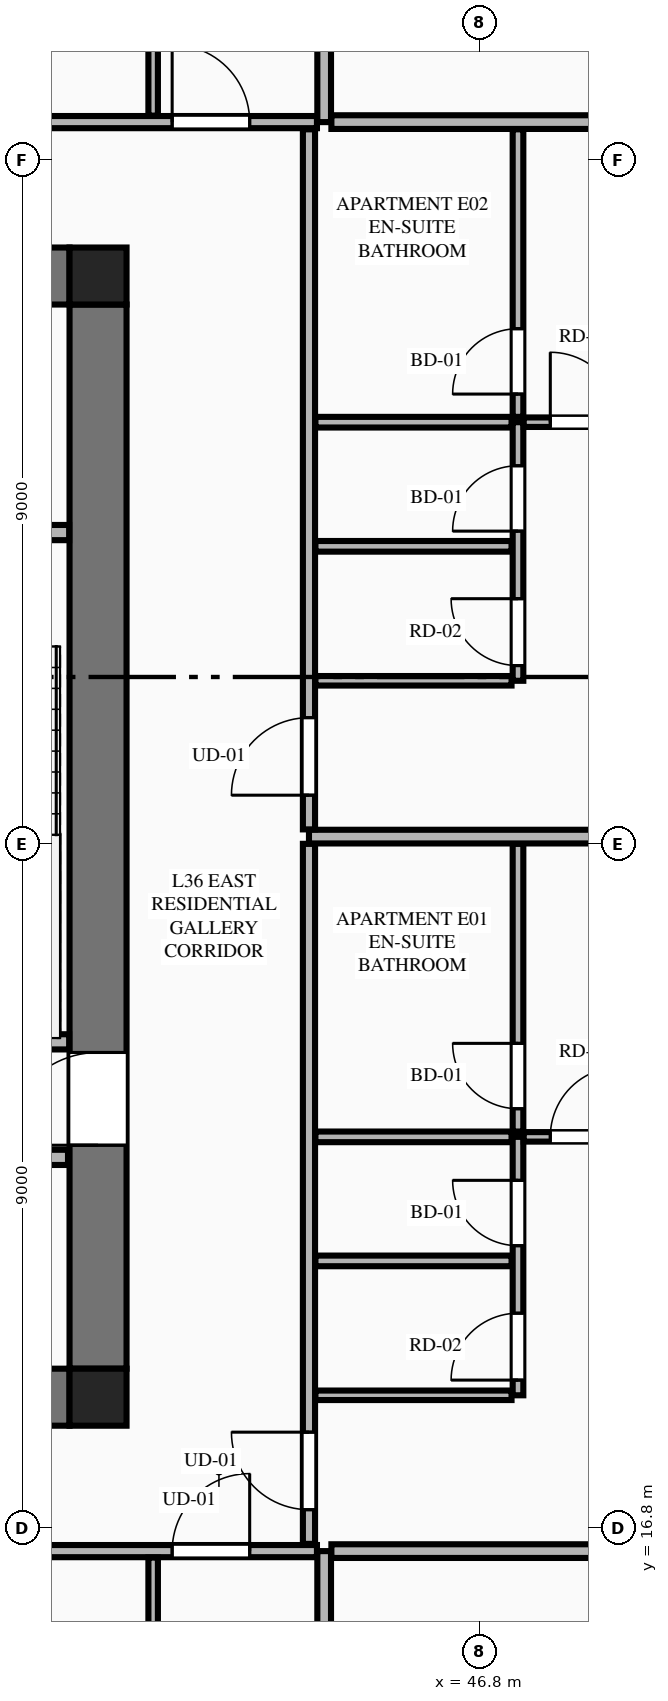
"""IFC4 building model, lengths in metres.
Left out: names, types, materials, properties, quantities, classifications, styles, units other than length and angle.
Written with IfcOpenShell. Run it as: python <this file> out.ifc"""

import sys

from ifc_helpers import new_model, si_unit, direction, frame, frame_2d, origin, origin_2d, place, context, subcontext, project, spatial, rectangle, extrude, element, fill, save


model = new_model("IFC4")
c1 = context("Model", 3, precision=1e-05, world=origin(), true_north=direction((0.0, 1.0)))
c2 = subcontext(c1, "Body", "Model", "MODEL_VIEW")
j1 = project(units=[si_unit("LENGTHUNIT", "METRE"), si_unit("PLANEANGLEUNIT", "RADIAN")], contexts=[c1])
p1 = place(None, origin())
s1 = spatial("IfcSite", under=j1, at=p1, CompositionType="ELEMENT")
p2 = place(p1, origin())
s2 = spatial("IfcBuilding", under=s1, at=p2, CompositionType="ELEMENT")
p3 = place(p2, frame((0.0, 0.0, 137.45)))
s3 = spatial("IfcBuildingStorey", under=s2, at=p3, CompositionType="ELEMENT", Elevation=137.45)
for number, where, z_axis, x_axis in (
    (1, (41.775, 18.525, 0.0), (0.0, 0.0, 1.0), (1.0, 0.0, 0.0)),
    (2, (41.775, 33.275, 0.0), (0.0, 0.0, 1.0), (1.0, 0.0, 0.0)),
):
    element("IfcColumn", number, at=place(p3, frame(where, z_axis=z_axis, x_axis=x_axis)), inside=s3, PredefinedType="COLUMN", context=c2, shape_type="SweptSolid", body=[
        extrude(rectangle(XDim=0.75, YDim=0.75, at=origin_2d()), origin(), (0.0, 0.0, 1.0), 3.55),
    ])
for number, where, z_axis, x_axis in (
    (3, (23.4, 18.525, 0.0), (0.0, 0.0, 1.0), (1.0, 0.0, 0.0)),
    (4, (23.4, 33.275, 0.0), (0.0, 0.0, 1.0), (1.0, 0.0, 0.0)),
):
    element("IfcWall", number, at=place(p3, frame(where, z_axis=z_axis, x_axis=x_axis)), inside=s3, PredefinedType="SHEAR", context=c2, shape_type="SweptSolid", body=[
        extrude(rectangle(XDim=18.0, YDim=0.75, at=frame_2d((9.0, 0.0))), origin(), (0.0, 0.0, 1.0), 3.34),
    ])
p4 = place(p3, frame((41.775, 18.9, 0.0), z_axis=(0.0, 0.0, 1.0), x_axis=(0.0, 1.0, 0.0)))
e5 = element("IfcWall", 5, at=p4, inside=s3, PredefinedType="SHEAR", context=c2, shape_type="SweptSolid", body=[
    extrude(rectangle(XDim=14.0, YDim=0.75, at=frame_2d((7.0, 0.0))), origin(), (0.0, 0.0, 1.0), 3.34),
])
p5 = place(p4, frame((2.94, 0.0, 0.0)))
e6 = element("IfcOpeningElement", 6, at=p5, cuts=e5, PredefinedType="OPENING", context=c2, shape_type="SweptSolid", body=[
    extrude(rectangle(XDim=1.22, YDim=2.25, at=frame_2d((0.61, 1.125))), frame((0.0, 0.385, 0.0), z_axis=(0.0, -1.0, 0.0), x_axis=(1.0, 0.0, 0.0)), (0.0, 0.0, 1.0), 0.77),
])
p6 = place(p3, frame((38.125, 23.2, 0.0), z_axis=(0.0, 0.0, 1.0), x_axis=(1.0, 0.0, 0.0)))
e7 = element("IfcWall", 7, at=p6, inside=s3, PredefinedType="PLUMBINGWALL", context=c2, shape_type="SweptSolid", body=[
    extrude(rectangle(XDim=3.27, YDim=0.2, at=frame_2d((1.635, 0.0))), origin(), (0.0, 0.0, 1.0), 3.34),
])
p7 = place(p3, frame((38.125, 29.9, 0.0), z_axis=(0.0, 0.0, 1.0), x_axis=(1.0, 0.0, 0.0)))
e8 = element("IfcWall", 8, at=p7, inside=s3, PredefinedType="PLUMBINGWALL", context=c2, shape_type="SweptSolid", body=[
    extrude(rectangle(XDim=3.27, YDim=0.2, at=frame_2d((1.635, 0.0))), origin(), (0.0, 0.0, 1.0), 3.34),
])
p8 = place(p7, frame((0.5, 0.0, 0.0)))
e9 = element("IfcOpeningElement", 9, at=p8, cuts=e8, PredefinedType="OPENING", context=c2, shape_type="SweptSolid", body=[
    extrude(rectangle(XDim=0.85, YDim=2.05, at=frame_2d((0.425, 1.025))), frame((0.0, 0.11, 0.0), z_axis=(0.0, -1.0, 0.0), x_axis=(1.0, 0.0, 0.0)), (0.0, 0.0, 1.0), 0.22),
])
p9 = place(p3, frame((23.42, 21.68, 0.0), z_axis=(0.0, 0.0, 1.0), x_axis=(1.0, 0.0, 0.0)))
e10 = element("IfcWall", 10, at=p9, inside=s3, PredefinedType="PLUMBINGWALL", context=c2, shape_type="SweptSolid", body=[
    extrude(rectangle(XDim=17.96, YDim=0.2, at=frame_2d((8.98, 0.0))), origin(), (0.0, 0.0, 1.0), 3.34),
])
p10 = place(p9, frame((11.6, 0.0, 0.0)))
e11 = element("IfcOpeningElement", 11, at=p10, cuts=e10, PredefinedType="OPENING", context=c2, shape_type="SweptSolid", body=[
    extrude(rectangle(XDim=1.1, YDim=2.2, at=frame_2d((0.55, 1.1))), frame((0.0, 0.11, 0.0), z_axis=(0.0, -1.0, 0.0), x_axis=(1.0, 0.0, 0.0)), (0.0, 0.0, 1.0), 0.22),
])
p11 = place(p9, frame((0.41, 0.0, 0.0)))
e12 = element("IfcOpeningElement", 12, at=p11, cuts=e10, PredefinedType="OPENING", context=c2, shape_type="SweptSolid", body=[
    extrude(rectangle(XDim=0.85, YDim=2.05, at=frame_2d((0.425, 1.025))), frame((0.0, 0.11, 0.0), z_axis=(0.0, -1.0, 0.0), x_axis=(1.0, 0.0, 0.0)), (0.0, 0.0, 1.0), 0.22),
])
p12 = place(p9, frame((6.03, 0.0, 0.0)))
e13 = element("IfcOpeningElement", 13, at=p12, cuts=e10, PredefinedType="OPENING", context=c2, shape_type="SweptSolid", body=[
    extrude(rectangle(XDim=0.85, YDim=2.05, at=frame_2d((0.425, 1.025))), frame((0.0, 0.11, 0.0), z_axis=(0.0, -1.0, 0.0), x_axis=(1.0, 0.0, 0.0)), (0.0, 0.0, 1.0), 0.22),
])
p13 = place(p9, frame((13.78, 0.0, 0.0)))
e14 = element("IfcOpeningElement", 14, at=p13, cuts=e10, PredefinedType="OPENING", context=c2, shape_type="SweptSolid", body=[
    extrude(rectangle(XDim=0.85, YDim=2.05, at=frame_2d((0.425, 1.025))), frame((0.0, 0.11, 0.0), z_axis=(0.0, -1.0, 0.0), x_axis=(1.0, 0.0, 0.0)), (0.0, 0.0, 1.0), 0.22),
])
p14 = place(p3, frame((44.75, 4.105, 0.0), z_axis=(0.0, 0.0, 1.0), x_axis=(0.0, 1.0, 0.0)))
e15 = element("IfcWall", 15, at=p14, inside=s3, PredefinedType="PARTITIONING", context=c2, shape_type="SweptSolid", body=[
    extrude(rectangle(XDim=12.395, YDim=0.18, at=frame_2d((6.198, 0.0))), origin(), (0.0, 0.0, 1.0), 3.34),
])
p15 = place(p3, frame((28.663, 16.5, 0.0), z_axis=(0.0, 0.0, 1.0), x_axis=(1.0, 0.0, 0.0)))
e16 = element("IfcWall", 16, at=p15, inside=s3, PredefinedType="PARTITIONING", context=c2, shape_type="SweptSolid", body=[
    extrude(rectangle(XDim=15.992, YDim=0.16, at=frame_2d((7.996, 0.0))), origin(), (0.0, 0.0, 1.0), 3.34),
])
p16 = place(p15, frame((14.087, 0.0, 0.0)))
e17 = element("IfcOpeningElement", 17, at=p16, cuts=e16, PredefinedType="OPENING", context=c2, shape_type="SweptSolid", body=[
    extrude(rectangle(XDim=1.02, YDim=2.25, at=frame_2d((0.51, 1.125))), frame((0.0, 0.09, 0.0), z_axis=(0.0, -1.0, 0.0), x_axis=(1.0, 0.0, 0.0)), (0.0, 0.0, 1.0), 0.18),
])
p17 = place(p3, frame((42.5, 12.887, 0.0), z_axis=(0.0, 0.0, 1.0), x_axis=(0.0, 1.0, 0.0)))
e18 = element("IfcWall", 18, at=p17, inside=s3, PredefinedType="PARTITIONING", context=c2, shape_type="SweptSolid", body=[
    extrude(rectangle(XDim=3.528, YDim=0.125, at=frame_2d((1.764, 0.0))), origin(), (0.0, 0.0, 1.0), 2.722),
])
p18 = place(p3, frame((44.75, 35.3, 0.0), z_axis=(0.0, 0.0, 1.0), x_axis=(0.0, 1.0, 0.0)))
e19 = element("IfcWall", 19, at=p18, inside=s3, PredefinedType="PARTITIONING", context=c2, shape_type="SweptSolid", body=[
    extrude(rectangle(XDim=12.195, YDim=0.18, at=frame_2d((6.098, 0.0))), origin(), (0.0, 0.0, 1.0), 3.34),
])
p19 = place(p3, frame((28.663, 35.3, 0.0), z_axis=(0.0, 0.0, 1.0), x_axis=(1.0, 0.0, 0.0)))
e20 = element("IfcWall", 20, at=p19, inside=s3, PredefinedType="PARTITIONING", context=c2, shape_type="SweptSolid", body=[
    extrude(rectangle(XDim=15.992, YDim=0.16, at=frame_2d((7.996, 0.0))), origin(), (0.0, 0.0, 1.0), 3.34),
])
p20 = place(p19, frame((14.087, 0.0, 0.0)))
e21 = element("IfcOpeningElement", 21, at=p20, cuts=e20, PredefinedType="OPENING", context=c2, shape_type="SweptSolid", body=[
    extrude(rectangle(XDim=1.02, YDim=2.25, at=frame_2d((0.51, 1.125))), frame((0.0, 0.09, 0.0), z_axis=(0.0, -1.0, 0.0), x_axis=(1.0, 0.0, 0.0)), (0.0, 0.0, 1.0), 0.18),
])
p21 = place(p3, frame((42.5, 35.385, 0.0), z_axis=(0.0, 0.0, 1.0), x_axis=(0.0, 1.0, 0.0)))
e22 = element("IfcWall", 22, at=p21, inside=s3, PredefinedType="PARTITIONING", context=c2, shape_type="SweptSolid", body=[
    extrude(rectangle(XDim=6.151, YDim=0.125, at=frame_2d((3.075, 0.0))), origin(), (0.0, 0.0, 1.0), 2.722),
])
p22 = place(p3, frame((44.845, 16.5, 0.0), z_axis=(0.0, 0.0, 1.0), x_axis=(1.0, 0.0, 0.0)))
e23 = element("IfcWall", 23, at=p22, inside=s3, PredefinedType="PARTITIONING", context=c2, shape_type="SweptSolid", body=[
    extrude(rectangle(XDim=7.77, YDim=0.18, at=frame_2d((3.885, 0.0))), origin(), (0.0, 0.0, 1.0), 3.34),
])
p23 = place(p3, frame((44.845, 35.3, 0.0), z_axis=(0.0, 0.0, 1.0), x_axis=(1.0, 0.0, 0.0)))
e24 = element("IfcWall", 24, at=p23, inside=s3, PredefinedType="PARTITIONING", context=c2, shape_type="SweptSolid", body=[
    extrude(rectangle(XDim=7.669, YDim=0.18, at=frame_2d((3.834, 0.0))), origin(), (0.0, 0.0, 1.0), 3.34),
])
p24 = place(p3, frame((44.55, 16.595, 0.0), z_axis=(0.0, 0.0, 1.0), x_axis=(0.0, 1.0, 0.0)))
e25 = element("IfcWall", 25, at=p24, inside=s3, PredefinedType="PARTITIONING", context=c2, shape_type="SweptSolid", body=[
    extrude(rectangle(XDim=9.21, YDim=0.16, at=frame_2d((4.605, 0.0))), origin(), (0.0, 0.0, 1.0), 3.34),
])
p25 = place(p24, frame((0.45, 0.0, 0.0)))
e26 = element("IfcOpeningElement", 26, at=p25, cuts=e25, PredefinedType="OPENING", context=c2, shape_type="SweptSolid", body=[
    extrude(rectangle(XDim=1.02, YDim=2.25, at=frame_2d((0.51, 1.125))), frame((0.0, 0.09, 0.0), z_axis=(0.0, -1.0, 0.0), x_axis=(1.0, 0.0, 0.0)), (0.0, 0.0, 1.0), 0.18),
])
p26 = place(p3, frame((44.635, 18.55, 0.0), z_axis=(0.0, 0.0, 1.0), x_axis=(1.0, 0.0, 0.0)))
e27 = element("IfcWall", 27, at=p26, inside=s3, PredefinedType="PARTITIONING", context=c2, shape_type="SweptSolid", body=[
    extrude(rectangle(XDim=2.58, YDim=0.125, at=frame_2d((1.29, 0.0))), origin(), (0.0, 0.0, 1.0), 2.722),
])
p27 = place(p3, frame((47.3, 18.55, 0.0), z_axis=(0.0, 0.0, 1.0), x_axis=(0.0, 1.0, 0.0)))
e28 = element("IfcWall", 28, at=p27, inside=s3, PredefinedType="PLUMBINGWALL", context=c2, shape_type="SweptSolid", body=[
    extrude(rectangle(XDim=3.4, YDim=0.14, at=frame_2d((1.7, 0.0))), origin(), (0.0, 0.0, 1.0), 3.34),
])
p28 = place(p27, frame((0.2, 0.0, 0.0)))
e29 = element("IfcOpeningElement", 29, at=p28, cuts=e28, PredefinedType="OPENING", context=c2, shape_type="SweptSolid", body=[
    extrude(rectangle(XDim=0.88, YDim=2.15, at=frame_2d((0.44, 1.075))), frame((0.0, 0.08, 0.0), z_axis=(0.0, -1.0, 0.0), x_axis=(1.0, 0.0, 0.0)), (0.0, 0.0, 1.0), 0.16),
])
p29 = place(p27, frame((1.968, 0.0, 0.0)))
e30 = element("IfcOpeningElement", 30, at=p29, cuts=e28, PredefinedType="OPENING", context=c2, shape_type="SweptSolid", body=[
    extrude(rectangle(XDim=0.86, YDim=2.1, at=frame_2d((0.43, 1.05))), frame((0.0, 0.08, 0.0), z_axis=(0.0, -1.0, 0.0), x_axis=(1.0, 0.0, 0.0)), (0.0, 0.0, 1.0), 0.16),
])
p30 = place(p3, frame((47.3, 22.02, 0.0), z_axis=(0.0, 0.0, 1.0), x_axis=(0.0, 1.0, 0.0)))
e31 = element("IfcWall", 31, at=p30, inside=s3, PredefinedType="PLUMBINGWALL", context=c2, shape_type="SweptSolid", body=[
    extrude(rectangle(XDim=3.785, YDim=0.14, at=frame_2d((1.893, 0.0))), origin(), (0.0, 0.0, 1.0), 3.34),
])
p31 = place(p30, frame((0.3, 0.0, 0.0)))
e32 = element("IfcOpeningElement", 32, at=p31, cuts=e31, PredefinedType="OPENING", context=c2, shape_type="SweptSolid", body=[
    extrude(rectangle(XDim=0.86, YDim=2.1, at=frame_2d((0.43, 1.05))), frame((0.0, 0.08, 0.0), z_axis=(0.0, -1.0, 0.0), x_axis=(1.0, 0.0, 0.0)), (0.0, 0.0, 1.0), 0.16),
])
p32 = place(p3, frame((44.635, 21.95, 0.0), z_axis=(0.0, 0.0, 1.0), x_axis=(1.0, 0.0, 0.0)))
e33 = element("IfcWall", 33, at=p32, inside=s3, PredefinedType="PLUMBINGWALL", context=c2, shape_type="SweptSolid", body=[
    extrude(rectangle(XDim=2.58, YDim=0.14, at=frame_2d((1.29, 0.0))), origin(), (0.0, 0.0, 1.0), 3.34),
])
p33 = place(p3, frame((47.375, 21.95, 0.0), z_axis=(0.0, 0.0, 1.0), x_axis=(1.0, 0.0, 0.0)))
e34 = element("IfcWall", 34, at=p33, inside=s3, PredefinedType="PARTITIONING", context=c2, shape_type="SweptSolid", body=[
    extrude(rectangle(XDim=8.013, YDim=0.125, at=frame_2d((4.006, 0.0))), origin(), (0.0, 0.0, 1.0), 3.34),
])
p34 = place(p33, frame((0.35, 0.0, 0.0)))
e35 = element("IfcOpeningElement", 35, at=p34, cuts=e34, PredefinedType="OPENING", context=c2, shape_type="SweptSolid", body=[
    extrude(rectangle(XDim=0.92, YDim=2.15, at=frame_2d((0.46, 1.075))), frame((0.0, 0.073, 0.0), z_axis=(0.0, -1.0, 0.0), x_axis=(1.0, 0.0, 0.0)), (0.0, 0.0, 1.0), 0.145),
])
p35 = place(p3, frame((44.635, 20.318, 0.0), z_axis=(0.0, 0.0, 1.0), x_axis=(1.0, 0.0, 0.0)))
e36 = element("IfcWall", 36, at=p35, inside=s3, PredefinedType="PLUMBINGWALL", context=c2, shape_type="SweptSolid", body=[
    extrude(rectangle(XDim=2.58, YDim=0.14, at=frame_2d((1.29, 0.0))), origin(), (0.0, 0.0, 1.0), 3.34),
])
p36 = place(p3, frame((44.55, 25.9, 0.0), z_axis=(0.0, 0.0, 1.0), x_axis=(1.0, 0.0, 0.0)))
e37 = element("IfcWall", 37, at=p36, inside=s3, PredefinedType="PARTITIONING", context=c2, shape_type="SweptSolid", body=[
    extrude(rectangle(XDim=12.308, YDim=0.18, at=frame_2d((6.154, 0.0))), origin(), (0.0, 0.0, 1.0), 3.34),
])
p37 = place(p3, frame((44.55, 25.995, 0.0), z_axis=(0.0, 0.0, 1.0), x_axis=(0.0, 1.0, 0.0)))
e38 = element("IfcWall", 38, at=p37, inside=s3, PredefinedType="PARTITIONING", context=c2, shape_type="SweptSolid", body=[
    extrude(rectangle(XDim=9.21, YDim=0.16, at=frame_2d((4.605, 0.0))), origin(), (0.0, 0.0, 1.0), 3.34),
])
p38 = place(p37, frame((0.45, 0.0, 0.0)))
e39 = element("IfcOpeningElement", 39, at=p38, cuts=e38, PredefinedType="OPENING", context=c2, shape_type="SweptSolid", body=[
    extrude(rectangle(XDim=1.02, YDim=2.25, at=frame_2d((0.51, 1.125))), frame((0.0, 0.09, 0.0), z_axis=(0.0, -1.0, 0.0), x_axis=(1.0, 0.0, 0.0)), (0.0, 0.0, 1.0), 0.18),
])
p39 = place(p3, frame((44.635, 27.95, 0.0), z_axis=(0.0, 0.0, 1.0), x_axis=(1.0, 0.0, 0.0)))
e40 = element("IfcWall", 40, at=p39, inside=s3, PredefinedType="PARTITIONING", context=c2, shape_type="SweptSolid", body=[
    extrude(rectangle(XDim=2.58, YDim=0.125, at=frame_2d((1.29, 0.0))), origin(), (0.0, 0.0, 1.0), 3.34),
])
p40 = place(p3, frame((47.3, 27.95, 0.0), z_axis=(0.0, 0.0, 1.0), x_axis=(0.0, 1.0, 0.0)))
e41 = element("IfcWall", 41, at=p40, inside=s3, PredefinedType="PLUMBINGWALL", context=c2, shape_type="SweptSolid", body=[
    extrude(rectangle(XDim=3.402, YDim=0.14, at=frame_2d((1.701, 0.0))), origin(), (0.0, 0.0, 1.0), 3.34),
])
p41 = place(p40, frame((0.2, 0.0, 0.0)))
e42 = element("IfcOpeningElement", 42, at=p41, cuts=e41, PredefinedType="OPENING", context=c2, shape_type="SweptSolid", body=[
    extrude(rectangle(XDim=0.88, YDim=2.15, at=frame_2d((0.44, 1.075))), frame((0.0, 0.08, 0.0), z_axis=(0.0, -1.0, 0.0), x_axis=(1.0, 0.0, 0.0)), (0.0, 0.0, 1.0), 0.16),
])
p42 = place(p40, frame((1.969, 0.0, 0.0)))
e43 = element("IfcOpeningElement", 43, at=p42, cuts=e41, PredefinedType="OPENING", context=c2, shape_type="SweptSolid", body=[
    extrude(rectangle(XDim=0.86, YDim=2.1, at=frame_2d((0.43, 1.05))), frame((0.0, 0.08, 0.0), z_axis=(0.0, -1.0, 0.0), x_axis=(1.0, 0.0, 0.0)), (0.0, 0.0, 1.0), 0.16),
])
p43 = place(p3, frame((47.3, 31.422, 0.0), z_axis=(0.0, 0.0, 1.0), x_axis=(0.0, 1.0, 0.0)))
e44 = element("IfcWall", 44, at=p43, inside=s3, PredefinedType="PLUMBINGWALL", context=c2, shape_type="SweptSolid", body=[
    extrude(rectangle(XDim=3.783, YDim=0.14, at=frame_2d((1.892, 0.0))), origin(), (0.0, 0.0, 1.0), 3.34),
])
p44 = place(p43, frame((0.3, 0.0, 0.0)))
e45 = element("IfcOpeningElement", 45, at=p44, cuts=e44, PredefinedType="OPENING", context=c2, shape_type="SweptSolid", body=[
    extrude(rectangle(XDim=0.86, YDim=2.1, at=frame_2d((0.43, 1.05))), frame((0.0, 0.08, 0.0), z_axis=(0.0, -1.0, 0.0), x_axis=(1.0, 0.0, 0.0)), (0.0, 0.0, 1.0), 0.16),
])
p45 = place(p3, frame((44.635, 31.352, 0.0), z_axis=(0.0, 0.0, 1.0), x_axis=(1.0, 0.0, 0.0)))
e46 = element("IfcWall", 46, at=p45, inside=s3, PredefinedType="PLUMBINGWALL", context=c2, shape_type="SweptSolid", body=[
    extrude(rectangle(XDim=2.58, YDim=0.14, at=frame_2d((1.29, 0.0))), origin(), (0.0, 0.0, 1.0), 3.34),
])
p46 = place(p3, frame((47.375, 31.352, 0.0), z_axis=(0.0, 0.0, 1.0), x_axis=(1.0, 0.0, 0.0)))
e47 = element("IfcWall", 47, at=p46, inside=s3, PredefinedType="PARTITIONING", context=c2, shape_type="SweptSolid", body=[
    extrude(rectangle(XDim=7.152, YDim=0.125, at=frame_2d((3.576, 0.0))), origin(), (0.0, 0.0, 1.0), 3.34),
])
p47 = place(p46, frame((0.35, 0.0, 0.0)))
e48 = element("IfcOpeningElement", 48, at=p47, cuts=e47, PredefinedType="OPENING", context=c2, shape_type="SweptSolid", body=[
    extrude(rectangle(XDim=0.92, YDim=2.15, at=frame_2d((0.46, 1.075))), frame((0.0, 0.073, 0.0), z_axis=(0.0, -1.0, 0.0), x_axis=(1.0, 0.0, 0.0)), (0.0, 0.0, 1.0), 0.145),
])
p48 = place(p3, frame((44.635, 29.719, 0.0), z_axis=(0.0, 0.0, 1.0), x_axis=(1.0, 0.0, 0.0)))
e49 = element("IfcWall", 49, at=p48, inside=s3, PredefinedType="PLUMBINGWALL", context=c2, shape_type="SweptSolid", body=[
    extrude(rectangle(XDim=2.58, YDim=0.14, at=frame_2d((1.29, 0.0))), origin(), (0.0, 0.0, 1.0), 3.34),
])
p49 = place(p5, origin())
e50 = element("IfcDoor", 50, at=p49, inside=s3, OperationType="SINGLE_SWING_LEFT", PredefinedType="DOOR", context=c2, shape_type="SweptSolid", body=[
    extrude(rectangle(XDim=1.22, YDim=2.25, at=frame_2d((0.61, 1.125))), frame((0.0, 0.025, 0.0), z_axis=(0.0, -1.0, 0.0), x_axis=(1.0, 0.0, 0.0)), (0.0, 0.0, 1.0), 0.05),
])
fill(e6, e50)
p50 = place(p16, origin())
e51 = element("IfcDoor", 51, at=p50, inside=s3, OperationType="SINGLE_SWING_RIGHT", PredefinedType="DOOR", context=c2, shape_type="SweptSolid", body=[
    extrude(rectangle(XDim=1.02, YDim=2.25, at=frame_2d((0.51, 1.125))), frame((0.0, 0.025, 0.0), z_axis=(0.0, -1.0, 0.0), x_axis=(1.0, 0.0, 0.0)), (0.0, 0.0, 1.0), 0.05),
])
fill(e17, e51)
p51 = place(p20, origin())
e52 = element("IfcDoor", 52, at=p51, inside=s3, OperationType="SINGLE_SWING_LEFT", PredefinedType="DOOR", context=c2, shape_type="SweptSolid", body=[
    extrude(rectangle(XDim=1.02, YDim=2.25, at=frame_2d((0.51, 1.125))), frame((0.0, 0.025, 0.0), z_axis=(0.0, -1.0, 0.0), x_axis=(1.0, 0.0, 0.0)), (0.0, 0.0, 1.0), 0.05),
])
fill(e21, e52)
p52 = place(p28, origin())
e53 = element("IfcDoor", 53, at=p52, inside=s3, OperationType="SINGLE_SWING_LEFT", PredefinedType="DOOR", context=c2, shape_type="SweptSolid", body=[
    extrude(rectangle(XDim=0.88, YDim=2.15, at=frame_2d((0.44, 1.075))), frame((0.0, 0.025, 0.0), z_axis=(0.0, -1.0, 0.0), x_axis=(1.0, 0.0, 0.0)), (0.0, 0.0, 1.0), 0.05),
])
fill(e29, e53)
p53 = place(p29, origin())
e54 = element("IfcDoor", 54, at=p53, inside=s3, OperationType="SINGLE_SWING_RIGHT", PredefinedType="DOOR", context=c2, shape_type="SweptSolid", body=[
    extrude(rectangle(XDim=0.86, YDim=2.1, at=frame_2d((0.43, 1.05))), frame((0.0, 0.025, 0.0), z_axis=(0.0, -1.0, 0.0), x_axis=(1.0, 0.0, 0.0)), (0.0, 0.0, 1.0), 0.05),
])
fill(e30, e54)
p54 = place(p31, origin())
e55 = element("IfcDoor", 55, at=p54, inside=s3, OperationType="SINGLE_SWING_RIGHT", PredefinedType="DOOR", context=c2, shape_type="SweptSolid", body=[
    extrude(rectangle(XDim=0.86, YDim=2.1, at=frame_2d((0.43, 1.05))), frame((0.0, 0.025, 0.0), z_axis=(0.0, -1.0, 0.0), x_axis=(1.0, 0.0, 0.0)), (0.0, 0.0, 1.0), 0.05),
])
fill(e32, e55)
p55 = place(p25, origin())
e56 = element("IfcDoor", 56, at=p55, inside=s3, OperationType="SINGLE_SWING_RIGHT", PredefinedType="DOOR", context=c2, shape_type="SweptSolid", body=[
    extrude(rectangle(XDim=1.02, YDim=2.25, at=frame_2d((0.51, 1.125))), frame((0.0, 0.025, 0.0), z_axis=(0.0, -1.0, 0.0), x_axis=(1.0, 0.0, 0.0)), (0.0, 0.0, 1.0), 0.05),
])
fill(e26, e56)
p56 = place(p34, origin())
e57 = element("IfcDoor", 57, at=p56, inside=s3, OperationType="SINGLE_SWING_RIGHT", PredefinedType="DOOR", context=c2, shape_type="SweptSolid", body=[
    extrude(rectangle(XDim=0.92, YDim=2.15, at=frame_2d((0.46, 1.075))), frame((0.0, 0.025, 0.0), z_axis=(0.0, -1.0, 0.0), x_axis=(1.0, 0.0, 0.0)), (0.0, 0.0, 1.0), 0.05),
])
fill(e35, e57)
p57 = place(p41, origin())
e58 = element("IfcDoor", 58, at=p57, inside=s3, OperationType="SINGLE_SWING_RIGHT", PredefinedType="DOOR", context=c2, shape_type="SweptSolid", body=[
    extrude(rectangle(XDim=0.88, YDim=2.15, at=frame_2d((0.44, 1.075))), frame((0.0, 0.025, 0.0), z_axis=(0.0, -1.0, 0.0), x_axis=(1.0, 0.0, 0.0)), (0.0, 0.0, 1.0), 0.05),
])
fill(e42, e58)
p58 = place(p42, origin())
e59 = element("IfcDoor", 59, at=p58, inside=s3, OperationType="SINGLE_SWING_LEFT", PredefinedType="DOOR", context=c2, shape_type="SweptSolid", body=[
    extrude(rectangle(XDim=0.86, YDim=2.1, at=frame_2d((0.43, 1.05))), frame((0.0, 0.025, 0.0), z_axis=(0.0, -1.0, 0.0), x_axis=(1.0, 0.0, 0.0)), (0.0, 0.0, 1.0), 0.05),
])
fill(e43, e59)
p59 = place(p44, origin())
e60 = element("IfcDoor", 60, at=p59, inside=s3, OperationType="SINGLE_SWING_LEFT", PredefinedType="DOOR", context=c2, shape_type="SweptSolid", body=[
    extrude(rectangle(XDim=0.86, YDim=2.1, at=frame_2d((0.43, 1.05))), frame((0.0, 0.025, 0.0), z_axis=(0.0, -1.0, 0.0), x_axis=(1.0, 0.0, 0.0)), (0.0, 0.0, 1.0), 0.05),
])
fill(e45, e60)
p60 = place(p38, origin())
e61 = element("IfcDoor", 61, at=p60, inside=s3, OperationType="SINGLE_SWING_LEFT", PredefinedType="DOOR", context=c2, shape_type="SweptSolid", body=[
    extrude(rectangle(XDim=1.02, YDim=2.25, at=frame_2d((0.51, 1.125))), frame((0.0, 0.025, 0.0), z_axis=(0.0, -1.0, 0.0), x_axis=(1.0, 0.0, 0.0)), (0.0, 0.0, 1.0), 0.05),
])
fill(e39, e61)
p61 = place(p47, origin())
e62 = element("IfcDoor", 62, at=p61, inside=s3, OperationType="SINGLE_SWING_LEFT", PredefinedType="DOOR", context=c2, shape_type="SweptSolid", body=[
    extrude(rectangle(XDim=0.92, YDim=2.15, at=frame_2d((0.46, 1.075))), frame((0.0, 0.025, 0.0), z_axis=(0.0, -1.0, 0.0), x_axis=(1.0, 0.0, 0.0)), (0.0, 0.0, 1.0), 0.05),
])
fill(e48, e62)
save(model, sys.argv[1])
